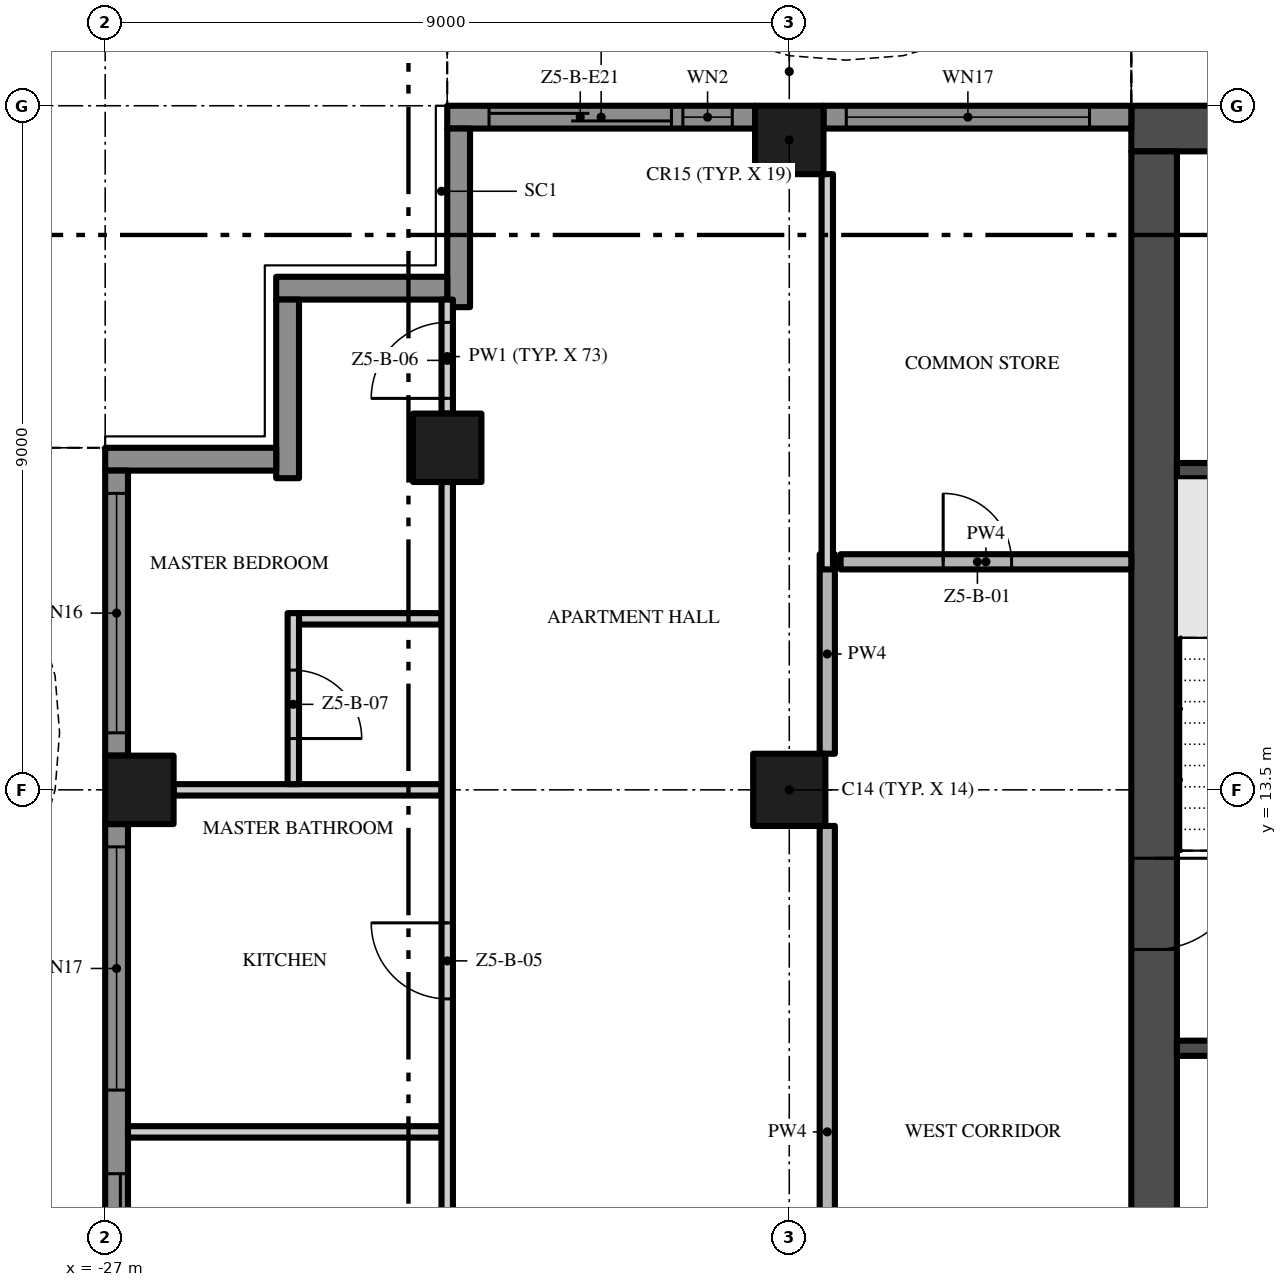
"""IFC4 building model, lengths in metres.
Left out: names, types, materials, properties, quantities, classifications, styles, units other than length and angle.
Written with IfcOpenShell. Run it as: python <this file> out.ifc"""

import sys

from ifc_helpers import new_model, si_unit, direction, frame, frame_2d, origin, origin_2d, place, context, subcontext, project, spatial, polyline, rectangle, outline, extrude, element, fill, save


model = new_model("IFC4")
c1 = context("Model", 3, precision=1e-05, world=origin(), true_north=direction((0.0, 1.0)))
c2 = subcontext(c1, "Body", "Model", "MODEL_VIEW")
j1 = project(units=[si_unit("LENGTHUNIT", "METRE"), si_unit("PLANEANGLEUNIT", "RADIAN")], contexts=[c1])
p1 = place(None, origin())
s1 = spatial("IfcSite", under=j1, at=p1, CompositionType="ELEMENT")
p2 = place(p1, origin())
s2 = spatial("IfcBuilding", under=s1, at=p2, CompositionType="ELEMENT")
p3 = place(p2, frame((0.0, 0.0, 257.8)))
s3 = spatial("IfcBuildingStorey", under=s2, at=p3, CompositionType="ELEMENT", Elevation=257.8)
p4 = place(p3, frame((13.5, 22.2, -0.3), z_axis=(0.0, 0.0, 1.0), x_axis=(-1.0, 0.0, 0.0)))
e1 = element("IfcWall", 1, at=p4, inside=s3, PredefinedType="SHEAR", context=c2, shape_type="SweptSolid", body=[
    extrude(rectangle(XDim=27.0, YDim=0.6, at=frame_2d((13.5, 0.0))), origin(), (0.0, 0.0, 1.0), 3.8),
])
p5 = place(p3, frame((-13.2, 21.9, -0.3), z_axis=(0.0, 0.0, 1.0), x_axis=(0.0, -1.0, 0.0)))
e2 = element("IfcWall", 2, at=p5, inside=s3, PredefinedType="SHEAR", context=c2, shape_type="SweptSolid", body=[
    extrude(rectangle(XDim=16.8, YDim=0.6, at=frame_2d((8.4, 0.0))), origin(), (0.0, 0.0, 1.0), 3.8),
])
p6 = place(p5, frame((9.3, 0.0, 0.3)))
e3 = element("IfcOpeningElement", 3, at=p6, cuts=e2, PredefinedType="OPENING", context=c2, shape_type="SweptSolid", body=[
    extrude(rectangle(XDim=1.2, YDim=2.2, at=frame_2d((0.6, 1.1))), frame((0.0, 0.31, 0.0), z_axis=(0.0, -1.0, 0.0), x_axis=(1.0, 0.0, 0.0)), (0.0, 0.0, 1.0), 0.62),
])
p7 = place(p3, frame((-18.0, 13.5, 0.0), z_axis=(0.0, 0.0, 1.0), x_axis=(1.0, 0.0, 0.0)))
e4 = element("IfcColumn", 4, at=p7, inside=s3, PredefinedType="COLUMN", context=c2, shape_type="SweptSolid", body=[
    extrude(rectangle(XDim=0.95, YDim=0.95, at=origin_2d()), origin(), (0.0, 0.0, 1.0), 3.5),
])
for number, where, z_axis, x_axis in (
    (5, (-18.0, 22.05, 0.0), (0.0, 0.0, 1.0), (1.0, 0.0, 0.0)),
    (6, (-26.55, 13.5, 0.0), (0.0, 0.0, 1.0), (1.0, 0.0, 0.0)),
    (7, (-22.5, 18.0, 0.0), (0.0, 0.0, 1.0), (1.0, 0.0, 0.0)),
):
    element("IfcColumn", number, at=place(p3, frame(where, z_axis=z_axis, x_axis=x_axis)), inside=s3, PredefinedType="COLUMN", context=c2, shape_type="SweptSolid", body=[
        extrude(rectangle(XDim=0.9, YDim=0.9, at=origin_2d()), origin(), (0.0, 0.0, 1.0), 3.5),
    ])
p8 = place(p3, frame((-17.55, 22.35, 0.0), z_axis=(0.0, 0.0, 1.0), x_axis=(1.0, 0.0, 0.0)))
e8 = element("IfcWall", 8, at=p8, inside=s3, PredefinedType="SOLIDWALL", context=c2, shape_type="SweptSolid", body=[
    extrude(rectangle(XDim=4.05, YDim=0.3, at=frame_2d((2.025, 0.0))), origin(), (0.0, 0.0, 1.0), 3.5),
])
p9 = place(p8, frame((0.3, 0.0, 0.45)))
e9 = element("IfcOpeningElement", 9, at=p9, cuts=e8, PredefinedType="OPENING", context=c2, shape_type="SweptSolid", body=[
    extrude(rectangle(XDim=3.2, YDim=2.65, at=frame_2d((1.6, 1.325))), frame((0.0, 0.16, 0.0), z_axis=(0.0, -1.0, 0.0), x_axis=(1.0, 0.0, 0.0)), (0.0, 0.0, 1.0), 0.32),
])
p10 = place(p3, frame((-22.5, 22.35, 0.0), z_axis=(0.0, 0.0, 1.0), x_axis=(1.0, 0.0, 0.0)))
e10 = element("IfcWall", 10, at=p10, inside=s3, PredefinedType="SOLIDWALL", context=c2, shape_type="SweptSolid", body=[
    extrude(rectangle(XDim=4.05, YDim=0.3, at=frame_2d((2.025, 0.0))), origin(), (0.0, 0.0, 1.0), 3.5),
])
p11 = place(p10, frame((3.1, 0.0, 0.45)))
e11 = element("IfcOpeningElement", 11, at=p11, cuts=e10, PredefinedType="OPENING", context=c2, shape_type="SweptSolid", body=[
    extrude(rectangle(XDim=0.65, YDim=2.65, at=frame_2d((0.325, 1.325))), frame((0.0, 0.16, 0.0), z_axis=(0.0, -1.0, 0.0), x_axis=(1.0, 0.0, 0.0)), (0.0, 0.0, 1.0), 0.32),
])
p12 = place(p10, frame((0.55, 0.0, 0.0)))
e12 = element("IfcOpeningElement", 12, at=p12, cuts=e10, PredefinedType="OPENING", context=c2, shape_type="SweptSolid", body=[
    extrude(rectangle(XDim=2.4, YDim=2.4, at=frame_2d((1.2, 1.2))), frame((0.0, 0.16, 0.0), z_axis=(0.0, -1.0, 0.0), x_axis=(1.0, 0.0, 0.0)), (0.0, 0.0, 1.0), 0.32),
])
p13 = place(p3, frame((-22.35, 19.85, 0.0), z_axis=(0.0, 0.0, 1.0), x_axis=(0.0, 1.0, 0.0)))
e13 = element("IfcWall", 13, at=p13, inside=s3, PredefinedType="SOLIDWALL", context=c2, shape_type="SweptSolid", body=[
    extrude(rectangle(XDim=2.35, YDim=0.3, at=frame_2d((1.175, 0.0))), origin(), (0.0, 0.0, 1.0), 3.5),
])
p14 = place(p3, frame((-24.75, 20.1, 0.0), z_axis=(0.0, 0.0, 1.0), x_axis=(1.0, 0.0, 0.0)))
e14 = element("IfcWall", 14, at=p14, inside=s3, PredefinedType="SOLIDWALL", context=c2, shape_type="SweptSolid", body=[
    extrude(rectangle(XDim=2.25, YDim=0.3, at=frame_2d((1.125, 0.0))), origin(), (0.0, 0.0, 1.0), 3.5),
])
p15 = place(p3, frame((-24.6, 17.6, 0.0), z_axis=(0.0, 0.0, 1.0), x_axis=(0.0, 1.0, 0.0)))
e15 = element("IfcWall", 15, at=p15, inside=s3, PredefinedType="SOLIDWALL", context=c2, shape_type="SweptSolid", body=[
    extrude(rectangle(XDim=2.35, YDim=0.3, at=frame_2d((1.175, 0.0))), origin(), (0.0, 0.0, 1.0), 3.5),
])
p16 = place(p3, frame((-27.0, 17.85, 0.0), z_axis=(0.0, 0.0, 1.0), x_axis=(1.0, 0.0, 0.0)))
e16 = element("IfcWall", 16, at=p16, inside=s3, PredefinedType="SOLIDWALL", context=c2, shape_type="SweptSolid", body=[
    extrude(rectangle(XDim=2.25, YDim=0.3, at=frame_2d((1.125, 0.0))), origin(), (0.0, 0.0, 1.0), 3.5),
])
p17 = place(p3, frame((-26.85, 13.95, 0.0), z_axis=(0.0, 0.0, 1.0), x_axis=(0.0, 1.0, 0.0)))
e17 = element("IfcWall", 17, at=p17, inside=s3, PredefinedType="SOLIDWALL", context=c2, shape_type="SweptSolid", body=[
    extrude(rectangle(XDim=3.75, YDim=0.3, at=frame_2d((1.875, 0.0))), origin(), (0.0, 0.0, 1.0), 3.5),
])
p18 = place(p17, frame((0.3, 0.0, 0.45)))
e18 = element("IfcOpeningElement", 18, at=p18, cuts=e17, PredefinedType="OPENING", context=c2, shape_type="SweptSolid", body=[
    extrude(rectangle(XDim=3.15, YDim=2.65, at=frame_2d((1.575, 1.325))), frame((0.0, 0.16, 0.0), z_axis=(0.0, -1.0, 0.0), x_axis=(1.0, 0.0, 0.0)), (0.0, 0.0, 1.0), 0.32),
])
p19 = place(p3, frame((-26.85, 4.95, 0.0), z_axis=(0.0, 0.0, 1.0), x_axis=(0.0, 1.0, 0.0)))
e19 = element("IfcWall", 19, at=p19, inside=s3, PredefinedType="SOLIDWALL", context=c2, shape_type="SweptSolid", body=[
    extrude(rectangle(XDim=8.1, YDim=0.3, at=frame_2d((4.05, 0.0))), origin(), (0.0, 0.0, 1.0), 3.5),
])
p20 = place(p19, frame((4.6, 0.0, 0.45)))
e20 = element("IfcOpeningElement", 20, at=p20, cuts=e19, PredefinedType="OPENING", context=c2, shape_type="SweptSolid", body=[
    extrude(rectangle(XDim=3.2, YDim=2.65, at=frame_2d((1.6, 1.325))), frame((0.0, 0.16, 0.0), z_axis=(0.0, -1.0, 0.0), x_axis=(1.0, 0.0, 0.0)), (0.0, 0.0, 1.0), 0.32),
])
p21 = place(p19, frame((0.3, 0.0, 0.0)))
e21 = element("IfcOpeningElement", 21, at=p21, cuts=e19, PredefinedType="OPENING", context=c2, shape_type="SweptSolid", body=[
    extrude(rectangle(XDim=3.2, YDim=2.4, at=frame_2d((1.6, 1.2))), frame((0.0, 0.16, 0.0), z_axis=(0.0, -1.0, 0.0), x_axis=(1.0, 0.0, 0.0)), (0.0, 0.0, 1.0), 0.32),
])
p22 = place(p3, origin())
e22 = element("IfcWall", 22, at=p22, inside=s3, PredefinedType="USERDEFINED", context=c2, shape_type="SweptSolid", body=[
    extrude(outline(polyline([(-13.5, 24.3), (-15.0, 23.595), (-16.5, 23.159), (-17.25, 23.1), (-18.0, 23.159), (-19.5, 23.595), (-21.0, 24.3), (-22.5, 25.005), (-22.606, 24.779), (-21.106, 24.074), (-19.589, 23.36), (-18.045, 22.911), (-17.25, 22.849), (-16.455, 22.911), (-14.911, 23.36), (-13.394, 24.074), (-13.5, 24.3)])), origin(), (0.0, 0.0, 1.0), 0.9),
])
p23 = place(p3, origin())
e23 = element("IfcWall", 23, at=p23, inside=s3, PredefinedType="USERDEFINED", context=c2, shape_type="SweptSolid", body=[
    extrude(outline(polyline([(-28.8, 18.0), (-28.095, 16.5), (-27.659, 15.0), (-27.6, 14.25), (-27.659, 13.5), (-28.095, 12.0), (-28.8, 10.5), (-29.505, 9.0), (-29.941, 7.5), (-30.0, 6.75), (-29.941, 6.0), (-29.505, 4.5), (-28.8, 3.0), (-28.095, 1.5), (-27.659, 0.0), (-27.6, -0.75), (-27.659, -1.5), (-28.095, -3.0), (-28.8, -4.5), (-29.505, -6.0), (-29.941, -7.5), (-30.0, -8.25), (-29.941, -9.0), (-29.505, -10.5), (-28.8, -12.0), (-28.095, -13.5), (-27.659, -15.0), (-27.6, -15.75), (-27.659, -16.5), (-28.095, -18.0), (-27.855, -18.07), (-27.411, -16.545), (-27.349, -15.75), (-27.411, -14.955), (-27.86, -13.411), (-28.574, -11.894), (-29.271, -10.411), (-29.694, -8.955), (-29.749, -8.25), (-29.694, -7.545), (-29.271, -6.089), (-28.574, -4.606), (-27.86, -3.089), (-27.411, -1.545), (-27.349, -0.75), (-27.411, 0.045), (-27.86, 1.589), (-28.574, 3.106), (-29.271, 4.589), (-29.694, 6.045), (-29.749, 6.75), (-29.694, 7.455), (-29.271, 8.911), (-28.574, 10.394), (-27.86, 11.911), (-27.411, 13.455), (-27.349, 14.25), (-27.411, 15.045), (-27.86, 16.589), (-28.574, 18.106), (-28.8, 18.0)])), origin(), (0.0, 0.0, 1.0), 0.9),
])
for number, where, z_axis, x_axis in (
    (24, (-12.9, 10.1, 0.0), (0.0, 0.0, 1.0), (1.0, 0.0, 0.0)),
    (25, (-12.9, 17.7, 0.0), (0.0, 0.0, 1.0), (1.0, 0.0, 0.0)),
):
    element("IfcWall", number, at=place(p3, frame(where, z_axis=z_axis, x_axis=x_axis)), inside=s3, PredefinedType="SHEAR", context=c2, shape_type="SweptSolid", body=[
        extrude(rectangle(XDim=3.25, YDim=0.2, at=frame_2d((1.625, 0.0))), origin(), (0.0, 0.0, 1.0), 3.5),
    ])
p24 = place(p3, frame((-26.7, 9.0, 0.0), z_axis=(0.0, 0.0, 1.0), x_axis=(1.0, 0.0, 0.0)))
e26 = element("IfcWall", 26, at=p24, inside=s3, PredefinedType="PARTITIONING", context=c2, shape_type="SweptSolid", body=[
    extrude(rectangle(XDim=4.125, YDim=0.15, at=frame_2d((2.062, 0.0))), origin(), (0.0, 0.0, 1.0), 3.5),
])
p25 = place(p3, frame((-26.1, 13.5, 0.0), z_axis=(0.0, 0.0, 1.0), x_axis=(1.0, 0.0, 0.0)))
e27 = element("IfcWall", 27, at=p25, inside=s3, PredefinedType="PARTITIONING", context=c2, shape_type="SweptSolid", body=[
    extrude(rectangle(XDim=3.525, YDim=0.15, at=frame_2d((1.762, 0.0))), origin(), (0.0, 0.0, 1.0), 3.5),
])
p26 = place(p3, frame((-24.45, 15.75, 0.0), z_axis=(0.0, 0.0, 1.0), x_axis=(1.0, 0.0, 0.0)))
e28 = element("IfcWall", 28, at=p26, inside=s3, PredefinedType="PARTITIONING", context=c2, shape_type="SweptSolid", body=[
    extrude(rectangle(XDim=1.875, YDim=0.15, at=frame_2d((0.938, 0.0))), origin(), (0.0, 0.0, 1.0), 3.5),
])
p27 = place(p3, frame((-17.325, 16.5, 0.0), z_axis=(0.0, 0.0, 1.0), x_axis=(1.0, 0.0, 0.0)))
e29 = element("IfcWall", 29, at=p27, inside=s3, PredefinedType="PARTITIONING", context=c2, shape_type="SweptSolid", body=[
    extrude(rectangle(XDim=3.825, YDim=0.2, at=frame_2d((1.913, 0.0))), origin(), (0.0, 0.0, 1.0), 3.5),
])
p28 = place(p27, frame((1.35, 0.0, 0.0)))
e30 = element("IfcOpeningElement", 30, at=p28, cuts=e29, PredefinedType="OPENING", context=c2, shape_type="SweptSolid", body=[
    extrude(rectangle(XDim=0.9, YDim=2.1, at=frame_2d((0.45, 1.05))), frame((0.0, 0.11, 0.0), z_axis=(0.0, -1.0, 0.0), x_axis=(1.0, 0.0, 0.0)), (0.0, 0.0, 1.0), 0.22),
])
p29 = place(p3, frame((-24.525, 15.825, 0.0), z_axis=(0.0, 0.0, 1.0), x_axis=(0.0, -1.0, 0.0)))
e31 = element("IfcWall", 31, at=p29, inside=s3, PredefinedType="PARTITIONING", context=c2, shape_type="SweptSolid", body=[
    extrude(rectangle(XDim=2.25, YDim=0.15, at=frame_2d((1.125, 0.0))), origin(), (0.0, 0.0, 1.0), 3.5),
])
p30 = place(p29, frame((0.75, 0.0, 0.0)))
e32 = element("IfcOpeningElement", 32, at=p30, cuts=e31, PredefinedType="OPENING", context=c2, shape_type="SweptSolid", body=[
    extrude(rectangle(XDim=0.9, YDim=2.1, at=frame_2d((0.45, 1.05))), frame((0.0, 0.085, 0.0), z_axis=(0.0, -1.0, 0.0), x_axis=(1.0, 0.0, 0.0)), (0.0, 0.0, 1.0), 0.17),
])
p31 = place(p3, frame((-22.5, 0.1, 0.0), z_axis=(0.0, 0.0, 1.0), x_axis=(0.0, 1.0, 0.0)))
e33 = element("IfcWall", 33, at=p31, inside=s3, PredefinedType="PARTITIONING", context=c2, shape_type="SweptSolid", body=[
    extrude(rectangle(XDim=17.45, YDim=0.15, at=frame_2d((8.725, 0.0))), origin(), (0.0, 0.0, 1.0), 3.5),
])
p32 = place(p31, frame((2.4, 0.0, 0.0)))
e34 = element("IfcOpeningElement", 34, at=p32, cuts=e33, PredefinedType="OPENING", context=c2, shape_type="SweptSolid", body=[
    extrude(rectangle(XDim=1.8, YDim=2.4, at=frame_2d((0.9, 1.2))), frame((0.0, 0.085, 0.0), z_axis=(0.0, -1.0, 0.0), x_axis=(1.0, 0.0, 0.0)), (0.0, 0.0, 1.0), 0.17),
])
p33 = place(p31, frame((10.65, 0.0, 0.0)))
e35 = element("IfcOpeningElement", 35, at=p33, cuts=e33, PredefinedType="OPENING", context=c2, shape_type="SweptSolid", body=[
    extrude(rectangle(XDim=1.0, YDim=2.4, at=frame_2d((0.5, 1.2))), frame((0.0, 0.085, 0.0), z_axis=(0.0, -1.0, 0.0), x_axis=(1.0, 0.0, 0.0)), (0.0, 0.0, 1.0), 0.17),
])
p34 = place(p3, frame((-22.5, 18.45, 0.0), z_axis=(0.0, 0.0, 1.0), x_axis=(0.0, 1.0, 0.0)))
e36 = element("IfcWall", 36, at=p34, inside=s3, PredefinedType="PARTITIONING", context=c2, shape_type="SweptSolid", body=[
    extrude(rectangle(XDim=1.5, YDim=0.15, at=frame_2d((0.75, 0.0))), origin(), (0.0, 0.0, 1.0), 3.5),
])
p35 = place(p34, frame((0.2, 0.0, 0.0)))
e37 = element("IfcOpeningElement", 37, at=p35, cuts=e36, PredefinedType="OPENING", context=c2, shape_type="SweptSolid", body=[
    extrude(rectangle(XDim=1.0, YDim=2.4, at=frame_2d((0.5, 1.2))), frame((0.0, 0.085, 0.0), z_axis=(0.0, -1.0, 0.0), x_axis=(1.0, 0.0, 0.0)), (0.0, 0.0, 1.0), 0.17),
])
p36 = place(p3, frame((-17.5, 4.975, 0.0), z_axis=(0.0, 0.0, 1.0), x_axis=(0.0, 1.0, 0.0)))
e38 = element("IfcWall", 38, at=p36, inside=s3, PredefinedType="PARTITIONING", context=c2, shape_type="SweptSolid", body=[
    extrude(rectangle(XDim=8.05, YDim=0.2, at=frame_2d((4.025, 0.0))), origin(), (0.0, 0.0, 1.0), 3.5),
])
p37 = place(p36, frame((1.2, 0.0, 0.0)))
e39 = element("IfcOpeningElement", 39, at=p37, cuts=e38, PredefinedType="OPENING", context=c2, shape_type="SweptSolid", body=[
    extrude(rectangle(XDim=1.2, YDim=2.4, at=frame_2d((0.6, 1.2))), frame((0.0, 0.11, 0.0), z_axis=(0.0, -1.0, 0.0), x_axis=(1.0, 0.0, 0.0)), (0.0, 0.0, 1.0), 0.22),
])
p38 = place(p3, frame((-17.5, 13.975, 0.0), z_axis=(0.0, 0.0, 1.0), x_axis=(0.0, 1.0, 0.0)))
e40 = element("IfcWall", 40, at=p38, inside=s3, PredefinedType="PARTITIONING", context=c2, shape_type="SweptSolid", body=[
    extrude(rectangle(XDim=2.625, YDim=0.2, at=frame_2d((1.312, 0.0))), origin(), (0.0, 0.0, 1.0), 3.5),
])
p39 = place(p3, frame((-17.5, 16.4, 0.0), z_axis=(0.0, 0.0, 1.0), x_axis=(0.0, 1.0, 0.0)))
e41 = element("IfcWall", 41, at=p39, inside=s3, PredefinedType="PARTITIONING", context=c2, shape_type="SweptSolid", body=[
    extrude(rectangle(XDim=5.2, YDim=0.15, at=frame_2d((2.6, 0.0))), origin(), (0.0, 0.0, 1.0), 3.5),
])
p40 = place(p9, origin())
e42 = element("IfcWindow", 42, at=p40, inside=s3, PartitioningType="SINGLE_PANEL", PredefinedType="WINDOW", context=c2, shape_type="SweptSolid", body=[
    extrude(rectangle(XDim=3.2, YDim=2.65, at=frame_2d((1.6, 1.325))), frame((0.0, 0.03, 0.0), z_axis=(0.0, -1.0, 0.0), x_axis=(1.0, 0.0, 0.0)), (0.0, 0.0, 1.0), 0.06),
])
fill(e9, e42)
p41 = place(p11, origin())
e43 = element("IfcWindow", 43, at=p41, inside=s3, PartitioningType="SINGLE_PANEL", PredefinedType="WINDOW", context=c2, shape_type="SweptSolid", body=[
    extrude(rectangle(XDim=0.65, YDim=2.65, at=frame_2d((0.325, 1.325))), frame((0.0, 0.03, 0.0), z_axis=(0.0, -1.0, 0.0), x_axis=(1.0, 0.0, 0.0)), (0.0, 0.0, 1.0), 0.06),
])
fill(e11, e43)
p42 = place(p12, origin())
e44 = element("IfcDoor", 44, at=p42, inside=s3, OperationType="SINGLE_SWING_LEFT", PredefinedType="DOOR", context=c2, shape_type="SweptSolid", body=[
    extrude(rectangle(XDim=2.4, YDim=2.4, at=frame_2d((1.2, 1.2))), frame((0.0, 0.025, 0.0), z_axis=(0.0, -1.0, 0.0), x_axis=(1.0, 0.0, 0.0)), (0.0, 0.0, 1.0), 0.05),
])
fill(e12, e44)
p43 = place(p18, origin())
e45 = element("IfcWindow", 45, at=p43, inside=s3, PartitioningType="SINGLE_PANEL", PredefinedType="WINDOW", context=c2, shape_type="SweptSolid", body=[
    extrude(rectangle(XDim=3.15, YDim=2.65, at=frame_2d((1.575, 1.325))), frame((0.0, 0.03, 0.0), z_axis=(0.0, -1.0, 0.0), x_axis=(1.0, 0.0, 0.0)), (0.0, 0.0, 1.0), 0.06),
])
fill(e18, e45)
p44 = place(p20, origin())
e46 = element("IfcWindow", 46, at=p44, inside=s3, PartitioningType="SINGLE_PANEL", PredefinedType="WINDOW", context=c2, shape_type="SweptSolid", body=[
    extrude(rectangle(XDim=3.2, YDim=2.65, at=frame_2d((1.6, 1.325))), frame((0.0, 0.03, 0.0), z_axis=(0.0, -1.0, 0.0), x_axis=(1.0, 0.0, 0.0)), (0.0, 0.0, 1.0), 0.06),
])
fill(e20, e46)
p45 = place(p21, origin())
e47 = element("IfcDoor", 47, at=p45, inside=s3, OperationType="SINGLE_SWING_LEFT", PredefinedType="DOOR", context=c2, shape_type="SweptSolid", body=[
    extrude(rectangle(XDim=3.2, YDim=2.4, at=frame_2d((1.6, 1.2))), frame((0.0, 0.025, 0.0), z_axis=(0.0, -1.0, 0.0), x_axis=(1.0, 0.0, 0.0)), (0.0, 0.0, 1.0), 0.05),
])
fill(e21, e47)
p46 = place(p6, frame((1.2, 0.0, 0.0), z_axis=(0.0, 0.0, 1.0), x_axis=(-1.0, 0.0, 0.0)))
e48 = element("IfcDoor", 48, at=p46, inside=s3, OperationType="SINGLE_SWING_RIGHT", PredefinedType="DOOR", context=c2, shape_type="SweptSolid", body=[
    extrude(rectangle(XDim=1.2, YDim=2.2, at=frame_2d((0.6, 1.1))), frame((0.0, 0.025, 0.0), z_axis=(0.0, -1.0, 0.0), x_axis=(1.0, 0.0, 0.0)), (0.0, 0.0, 1.0), 0.05),
])
fill(e3, e48)
p47 = place(p28, origin())
e49 = element("IfcDoor", 49, at=p47, inside=s3, OperationType="SINGLE_SWING_LEFT", PredefinedType="DOOR", context=c2, shape_type="SweptSolid", body=[
    extrude(rectangle(XDim=0.9, YDim=2.1, at=frame_2d((0.45, 1.05))), frame((0.0, 0.025, 0.0), z_axis=(0.0, -1.0, 0.0), x_axis=(1.0, 0.0, 0.0)), (0.0, 0.0, 1.0), 0.05),
])
fill(e30, e49)
p48 = place(p33, origin())
e50 = element("IfcDoor", 50, at=p48, inside=s3, OperationType="SINGLE_SWING_RIGHT", PredefinedType="DOOR", context=c2, shape_type="SweptSolid", body=[
    extrude(rectangle(XDim=1.0, YDim=2.4, at=frame_2d((0.5, 1.2))), frame((0.0, 0.025, 0.0), z_axis=(0.0, -1.0, 0.0), x_axis=(1.0, 0.0, 0.0)), (0.0, 0.0, 1.0), 0.05),
])
fill(e35, e50)
p49 = place(p35, origin())
e51 = element("IfcDoor", 51, at=p49, inside=s3, OperationType="SINGLE_SWING_LEFT", PredefinedType="DOOR", context=c2, shape_type="SweptSolid", body=[
    extrude(rectangle(XDim=1.0, YDim=2.4, at=frame_2d((0.5, 1.2))), frame((0.0, 0.025, 0.0), z_axis=(0.0, -1.0, 0.0), x_axis=(1.0, 0.0, 0.0)), (0.0, 0.0, 1.0), 0.05),
])
fill(e37, e51)
p50 = place(p30, origin())
e52 = element("IfcDoor", 52, at=p50, inside=s3, OperationType="SINGLE_SWING_RIGHT", PredefinedType="DOOR", context=c2, shape_type="SweptSolid", body=[
    extrude(rectangle(XDim=0.9, YDim=2.1, at=frame_2d((0.45, 1.05))), frame((0.0, 0.025, 0.0), z_axis=(0.0, -1.0, 0.0), x_axis=(1.0, 0.0, 0.0)), (0.0, 0.0, 1.0), 0.05),
])
fill(e32, e52)
save(model, sys.argv[1])
